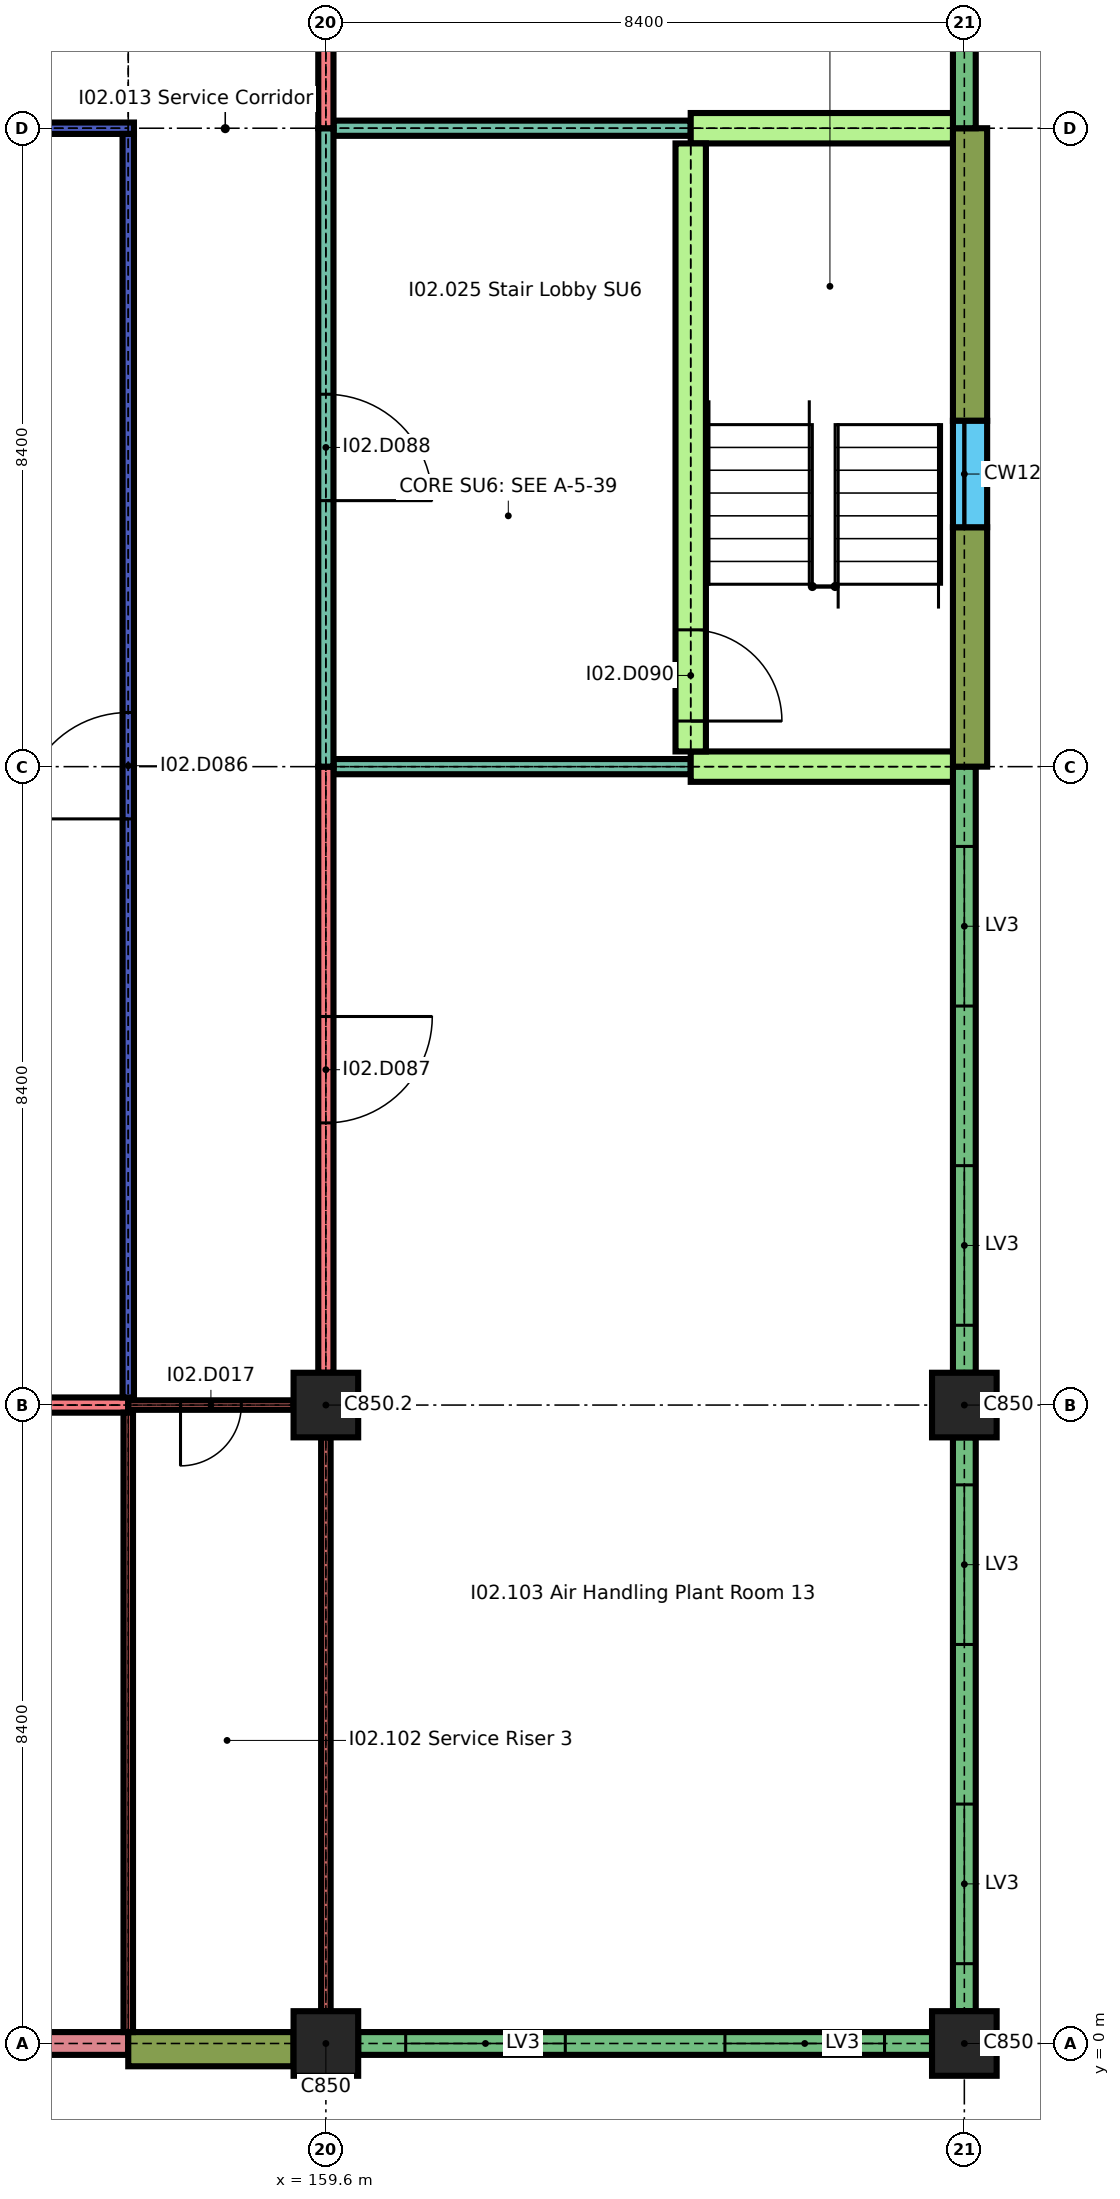
"""IFC4 building model, lengths in metres.
Left out: names, types, materials, properties, quantities, classifications, styles, units other than length and angle.
Written with IfcOpenShell. Run it as: python <this file> out.ifc"""

import sys

from ifc_helpers import new_model, si_unit, direction, frame, frame_2d, origin, origin_2d, place, context, subcontext, project, spatial, rectangle, extrude, element, fill, save


model = new_model("IFC4")
c1 = context("Model", 3, precision=1e-05, world=origin(), true_north=direction((0.0, 1.0)))
c2 = subcontext(c1, "Body", "Model", "MODEL_VIEW")
j1 = project(units=[si_unit("LENGTHUNIT", "METRE"), si_unit("PLANEANGLEUNIT", "RADIAN")], contexts=[c1])
p1 = place(None, origin())
s1 = spatial("IfcSite", under=j1, at=p1, CompositionType="ELEMENT")
p2 = place(p1, origin())
s2 = spatial("IfcBuilding", under=s1, at=p2, CompositionType="ELEMENT")
p3 = place(p2, frame((0.0, 0.0, 12.9)))
s3 = spatial("IfcBuildingStorey", under=s2, at=p3, CompositionType="ELEMENT", Elevation=12.9)
for number, where, z_axis, x_axis in (
    (1, (159.6, 0.0, 0.0), (0.0, 0.0, 1.0), (1.0, 0.0, 0.0)),
    (2, (168.0, 0.0, 0.0), (0.0, 0.0, 1.0), (1.0, 0.0, 0.0)),
    (3, (159.6, 8.4, 0.0), (0.0, 0.0, 1.0), (1.0, 0.0, 0.0)),
    (4, (168.0, 8.4, 0.0), (0.0, 0.0, 1.0), (1.0, 0.0, 0.0)),
):
    element("IfcColumn", number, at=place(p3, frame(where, z_axis=z_axis, x_axis=x_axis)), inside=s3, PredefinedType="COLUMN", context=c2, shape_type="SweptSolid", body=[
        extrude(rectangle(XDim=0.85, YDim=0.85, at=origin_2d()), origin(), (0.0, 0.0, 1.0), 2.04),
    ])
p4 = place(p3, frame((151.625, 0.0, 0.0), z_axis=(0.0, 0.0, 1.0), x_axis=(1.0, 0.0, 0.0)))
e5 = element("IfcWall", 5, at=p4, inside=s3, PredefinedType="SOLIDWALL", context=c2, shape_type="SweptSolid", body=[
    extrude(rectangle(XDim=5.375, YDim=0.3, at=frame_2d((2.688, 0.0))), origin(), (0.0, 0.0, 1.0), 2.04),
])
p5 = place(p4, frame((0.625, 0.0, 0.6)))
e6 = element("IfcOpeningElement", 6, at=p5, cuts=e5, PredefinedType="OPENING", context=c2, shape_type="SweptSolid", body=[
    extrude(rectangle(XDim=2.1, YDim=1.05, at=frame_2d((1.05, 0.525))), frame((0.0, 0.16, 0.0), z_axis=(0.0, -1.0, 0.0), x_axis=(1.0, 0.0, 0.0)), (0.0, 0.0, 1.0), 0.32),
])
p6 = place(p3, frame((157.0, -0.075, 0.0), z_axis=(0.0, 0.0, 1.0), x_axis=(1.0, 0.0, 0.0)))
e7 = element("IfcWall", 7, at=p6, inside=s3, PredefinedType="SOLIDWALL", context=c2, shape_type="SweptSolid", body=[
    extrude(rectangle(XDim=2.175, YDim=0.45, at=frame_2d((1.087, 0.0))), origin(), (0.0, 0.0, 1.0), 2.04),
])
p7 = place(p3, frame((160.025, 0.0, 0.0), z_axis=(0.0, 0.0, 1.0), x_axis=(1.0, 0.0, 0.0)))
e8 = element("IfcWall", 8, at=p7, inside=s3, PredefinedType="SOLIDWALL", context=c2, shape_type="SweptSolid", body=[
    extrude(rectangle(XDim=7.55, YDim=0.3, at=frame_2d((3.775, 0.0))), origin(), (0.0, 0.0, 1.0), 1.74),
])
p8 = place(p7, frame((0.625, 0.0, 0.6)))
e9 = element("IfcOpeningElement", 9, at=p8, cuts=e8, PredefinedType="OPENING", context=c2, shape_type="SweptSolid", body=[
    extrude(rectangle(XDim=2.1, YDim=1.05, at=frame_2d((1.05, 0.525))), frame((0.0, 0.16, 0.0), z_axis=(0.0, -1.0, 0.0), x_axis=(1.0, 0.0, 0.0)), (0.0, 0.0, 1.0), 0.32),
])
p9 = place(p7, frame((4.825, 0.0, 0.6)))
e10 = element("IfcOpeningElement", 10, at=p9, cuts=e8, PredefinedType="OPENING", context=c2, shape_type="SweptSolid", body=[
    extrude(rectangle(XDim=2.1, YDim=1.05, at=frame_2d((1.05, 0.525))), frame((0.0, 0.16, 0.0), z_axis=(0.0, -1.0, 0.0), x_axis=(1.0, 0.0, 0.0)), (0.0, 0.0, 1.0), 0.32),
])
p10 = place(p3, frame((168.0, 0.425, 0.0), z_axis=(0.0, 0.0, 1.0), x_axis=(0.0, 1.0, 0.0)))
e11 = element("IfcWall", 11, at=p10, inside=s3, PredefinedType="SOLIDWALL", context=c2, shape_type="SweptSolid", body=[
    extrude(rectangle(XDim=7.55, YDim=0.3, at=frame_2d((3.775, 0.0))), origin(), (0.0, 0.0, 1.0), 1.74),
])
p11 = place(p10, frame((0.625, 0.0, 0.6)))
e12 = element("IfcOpeningElement", 12, at=p11, cuts=e11, PredefinedType="OPENING", context=c2, shape_type="SweptSolid", body=[
    extrude(rectangle(XDim=2.1, YDim=1.05, at=frame_2d((1.05, 0.525))), frame((0.0, 0.16, 0.0), z_axis=(0.0, -1.0, 0.0), x_axis=(1.0, 0.0, 0.0)), (0.0, 0.0, 1.0), 0.32),
])
p12 = place(p10, frame((4.825, 0.0, 0.6)))
e13 = element("IfcOpeningElement", 13, at=p12, cuts=e11, PredefinedType="OPENING", context=c2, shape_type="SweptSolid", body=[
    extrude(rectangle(XDim=2.1, YDim=1.05, at=frame_2d((1.05, 0.525))), frame((0.0, 0.16, 0.0), z_axis=(0.0, -1.0, 0.0), x_axis=(1.0, 0.0, 0.0)), (0.0, 0.0, 1.0), 0.32),
])
p13 = place(p3, frame((168.0, 8.825, 0.0), z_axis=(0.0, 0.0, 1.0), x_axis=(0.0, 1.0, 0.0)))
e14 = element("IfcWall", 14, at=p13, inside=s3, PredefinedType="SOLIDWALL", context=c2, shape_type="SweptSolid", body=[
    extrude(rectangle(XDim=7.975, YDim=0.3, at=frame_2d((3.988, 0.0))), origin(), (0.0, 0.0, 1.0), 1.74),
])
p14 = place(p13, frame((0.625, 0.0, 0.6)))
e15 = element("IfcOpeningElement", 15, at=p14, cuts=e14, PredefinedType="OPENING", context=c2, shape_type="SweptSolid", body=[
    extrude(rectangle(XDim=2.1, YDim=1.05, at=frame_2d((1.05, 0.525))), frame((0.0, 0.16, 0.0), z_axis=(0.0, -1.0, 0.0), x_axis=(1.0, 0.0, 0.0)), (0.0, 0.0, 1.0), 0.32),
])
p15 = place(p13, frame((4.825, 0.0, 0.6)))
e16 = element("IfcOpeningElement", 16, at=p15, cuts=e14, PredefinedType="OPENING", context=c2, shape_type="SweptSolid", body=[
    extrude(rectangle(XDim=2.1, YDim=1.05, at=frame_2d((1.05, 0.525))), frame((0.0, 0.16, 0.0), z_axis=(0.0, -1.0, 0.0), x_axis=(1.0, 0.0, 0.0)), (0.0, 0.0, 1.0), 0.32),
])
p16 = place(p3, frame((168.075, 16.8, 0.0), z_axis=(0.0, 0.0, 1.0), x_axis=(0.0, 1.0, 0.0)))
e17 = element("IfcWall", 17, at=p16, inside=s3, PredefinedType="SOLIDWALL", context=c2, shape_type="SweptSolid", body=[
    extrude(rectangle(XDim=3.15, YDim=0.45, at=frame_2d((1.575, 0.0))), origin(), (0.0, 0.0, 1.0), 2.04),
])
p17 = place(p3, frame((168.075, 21.35, 0.0), z_axis=(0.0, 0.0, 1.0), x_axis=(0.0, 1.0, 0.0)))
e18 = element("IfcWall", 18, at=p17, inside=s3, PredefinedType="SOLIDWALL", context=c2, shape_type="SweptSolid", body=[
    extrude(rectangle(XDim=3.85, YDim=0.45, at=frame_2d((1.925, 0.0))), origin(), (0.0, 0.0, 1.0), 2.04),
])
p18 = place(p3, frame((168.075, 19.95, 0.0), z_axis=(0.0, 0.0, 1.0), x_axis=(0.0, 1.0, 0.0)))
e19 = element("IfcWall", 19, at=p18, inside=s3, PredefinedType="SOLIDWALL", context=c2, shape_type="SweptSolid", body=[
    extrude(rectangle(XDim=1.4, YDim=0.45, at=frame_2d((0.7, 0.0))), origin(), (0.0, 0.0, 1.0), 0.6),
])
p19 = place(p3, frame((168.0, 25.2, 0.0), z_axis=(0.0, 0.0, 1.0), x_axis=(0.0, 1.0, 0.0)))
e20 = element("IfcWall", 20, at=p19, inside=s3, PredefinedType="SOLIDWALL", context=c2, shape_type="SweptSolid", body=[
    extrude(rectangle(XDim=7.975, YDim=0.3, at=frame_2d((3.988, 0.0))), origin(), (0.0, 0.0, 1.0), 1.74),
])
p20 = place(p19, frame((1.05, 0.0, 0.6)))
e21 = element("IfcOpeningElement", 21, at=p20, cuts=e20, PredefinedType="OPENING", context=c2, shape_type="SweptSolid", body=[
    extrude(rectangle(XDim=2.1, YDim=1.05, at=frame_2d((1.05, 0.525))), frame((0.0, 0.16, 0.0), z_axis=(0.0, -1.0, 0.0), x_axis=(1.0, 0.0, 0.0)), (0.0, 0.0, 1.0), 0.32),
])
p21 = place(p19, frame((5.25, 0.0, 0.6)))
e22 = element("IfcOpeningElement", 22, at=p21, cuts=e20, PredefinedType="OPENING", context=c2, shape_type="SweptSolid", body=[
    extrude(rectangle(XDim=2.1, YDim=1.05, at=frame_2d((1.05, 0.525))), frame((0.0, 0.16, 0.0), z_axis=(0.0, -1.0, 0.0), x_axis=(1.0, 0.0, 0.0)), (0.0, 0.0, 1.0), 0.32),
])
p22 = place(p3, frame((151.625, 8.4, 0.0), z_axis=(0.0, 0.0, 1.0), x_axis=(1.0, 0.0, 0.0)))
e23 = element("IfcWall", 23, at=p22, inside=s3, PredefinedType="SOLIDWALL", context=c2, shape_type="SweptSolid", body=[
    extrude(rectangle(XDim=5.375, YDim=0.2, at=frame_2d((2.688, 0.0))), origin(), (0.0, 0.0, 1.0), 2.04),
])
p23 = place(p3, frame((157.0, 8.4, 0.0), z_axis=(0.0, 0.0, 1.0), x_axis=(1.0, 0.0, 0.0)))
e24 = element("IfcWall", 24, at=p23, inside=s3, PredefinedType="SOLIDWALL", context=c2, shape_type="SweptSolid", body=[
    extrude(rectangle(XDim=2.175, YDim=0.125, at=frame_2d((1.087, 0.0))), origin(), (0.0, 0.0, 1.0), 2.04),
])
p24 = place(p23, frame((0.688, 0.0, 0.0)))
e25 = element("IfcOpeningElement", 25, at=p24, cuts=e24, PredefinedType="OPENING", context=c2, shape_type="SweptSolid", body=[
    extrude(rectangle(XDim=0.8, YDim=2.0, at=frame_2d((0.4, 1.0))), frame((0.0, 0.073, 0.0), z_axis=(0.0, -1.0, 0.0), x_axis=(1.0, 0.0, 0.0)), (0.0, 0.0, 1.0), 0.145),
])
p25 = place(p3, frame((159.7, 16.8, 0.0), z_axis=(0.0, 0.0, 1.0), x_axis=(1.0, 0.0, 0.0)))
e26 = element("IfcWall", 26, at=p25, inside=s3, PredefinedType="PARTITIONING", context=c2, shape_type="SweptSolid", body=[
    extrude(rectangle(XDim=4.7, YDim=0.2, at=frame_2d((2.35, 0.0))), origin(), (0.0, 0.0, 1.0), 2.04),
])
p26 = place(p3, frame((164.4, 16.8, 0.0), z_axis=(0.0, 0.0, 1.0), x_axis=(1.0, 0.0, 0.0)))
e27 = element("IfcWall", 27, at=p26, inside=s3, PredefinedType="SHEAR", context=c2, shape_type="SweptSolid", body=[
    extrude(rectangle(XDim=3.45, YDim=0.4, at=frame_2d((1.725, 0.0))), origin(), (0.0, 0.0, 1.0), 2.04),
])
p27 = place(p3, frame((151.625, 25.2, 0.0), z_axis=(0.0, 0.0, 1.0), x_axis=(1.0, 0.0, 0.0)))
e28 = element("IfcWall", 28, at=p27, inside=s3, PredefinedType="PARTITIONING", context=c2, shape_type="SweptSolid", body=[
    extrude(rectangle(XDim=5.45, YDim=0.15, at=frame_2d((2.725, 0.0))), origin(), (0.0, 0.0, 1.0), 2.04),
])
p28 = place(p3, frame((159.7, 25.2, 0.0), z_axis=(0.0, 0.0, 1.0), x_axis=(1.0, 0.0, 0.0)))
e29 = element("IfcWall", 29, at=p28, inside=s3, PredefinedType="PARTITIONING", context=c2, shape_type="SweptSolid", body=[
    extrude(rectangle(XDim=4.7, YDim=0.2, at=frame_2d((2.35, 0.0))), origin(), (0.0, 0.0, 1.0), 2.04),
])
p29 = place(p3, frame((164.4, 25.2, 0.0), z_axis=(0.0, 0.0, 1.0), x_axis=(1.0, 0.0, 0.0)))
e30 = element("IfcWall", 30, at=p29, inside=s3, PredefinedType="SHEAR", context=c2, shape_type="SweptSolid", body=[
    extrude(rectangle(XDim=3.45, YDim=0.4, at=frame_2d((1.725, 0.0))), origin(), (0.0, 0.0, 1.0), 2.04),
])
p30 = place(p3, frame((157.0, 0.15, 0.0), z_axis=(0.0, 0.0, 1.0), x_axis=(0.0, 1.0, 0.0)))
e31 = element("IfcWall", 31, at=p30, inside=s3, PredefinedType="SOLIDWALL", context=c2, shape_type="SweptSolid", body=[
    extrude(rectangle(XDim=8.15, YDim=0.125, at=frame_2d((4.075, 0.0))), origin(), (0.0, 0.0, 1.0), 2.04),
])
p31 = place(p3, frame((157.0, 8.5, 0.0), z_axis=(0.0, 0.0, 1.0), x_axis=(0.0, 1.0, 0.0)))
e32 = element("IfcWall", 32, at=p31, inside=s3, PredefinedType="PARTITIONING", context=c2, shape_type="SweptSolid", body=[
    extrude(rectangle(XDim=16.625, YDim=0.15, at=frame_2d((8.312, 0.0))), origin(), (0.0, 0.0, 1.0), 2.04),
])
p32 = place(p31, frame((7.613, 0.0, 0.0)))
e33 = element("IfcOpeningElement", 33, at=p32, cuts=e32, PredefinedType="OPENING", context=c2, shape_type="SweptSolid", body=[
    extrude(rectangle(XDim=1.4, YDim=2.0, at=frame_2d((0.7, 1.0))), frame((0.0, 0.085, 0.0), z_axis=(0.0, -1.0, 0.0), x_axis=(1.0, 0.0, 0.0)), (0.0, 0.0, 1.0), 0.17),
])
p33 = place(p3, frame((159.6, 0.425, 0.0), z_axis=(0.0, 0.0, 1.0), x_axis=(0.0, 1.0, 0.0)))
e34 = element("IfcWall", 34, at=p33, inside=s3, PredefinedType="SOLIDWALL", context=c2, shape_type="SweptSolid", body=[
    extrude(rectangle(XDim=7.55, YDim=0.125, at=frame_2d((3.775, 0.0))), origin(), (0.0, 0.0, 1.0), 2.04),
])
p34 = place(p3, frame((159.6, 8.825, 0.0), z_axis=(0.0, 0.0, 1.0), x_axis=(0.0, 1.0, 0.0)))
e35 = element("IfcWall", 35, at=p34, inside=s3, PredefinedType="SOLIDWALL", context=c2, shape_type="SweptSolid", body=[
    extrude(rectangle(XDim=7.975, YDim=0.2, at=frame_2d((3.988, 0.0))), origin(), (0.0, 0.0, 1.0), 2.04),
])
p35 = place(p34, frame((3.288, 0.0, 0.0)))
e36 = element("IfcOpeningElement", 36, at=p35, cuts=e35, PredefinedType="OPENING", context=c2, shape_type="SweptSolid", body=[
    extrude(rectangle(XDim=1.4, YDim=2.0, at=frame_2d((0.7, 1.0))), frame((0.0, 0.11, 0.0), z_axis=(0.0, -1.0, 0.0), x_axis=(1.0, 0.0, 0.0)), (0.0, 0.0, 1.0), 0.22),
])
p36 = place(p3, frame((159.6, 16.8, 0.0), z_axis=(0.0, 0.0, 1.0), x_axis=(0.0, 1.0, 0.0)))
e37 = element("IfcWall", 37, at=p36, inside=s3, PredefinedType="PARTITIONING", context=c2, shape_type="SweptSolid", body=[
    extrude(rectangle(XDim=8.4, YDim=0.2, at=frame_2d((4.2, 0.0))), origin(), (0.0, 0.0, 1.0), 2.04),
])
p37 = place(p36, frame((3.5, 0.0, 0.0)))
e38 = element("IfcOpeningElement", 38, at=p37, cuts=e37, PredefinedType="OPENING", context=c2, shape_type="SweptSolid", body=[
    extrude(rectangle(XDim=1.4, YDim=2.0, at=frame_2d((0.7, 1.0))), frame((0.0, 0.11, 0.0), z_axis=(0.0, -1.0, 0.0), x_axis=(1.0, 0.0, 0.0)), (0.0, 0.0, 1.0), 0.22),
])
p38 = place(p3, frame((159.6, 25.2, 0.0), z_axis=(0.0, 0.0, 1.0), x_axis=(0.0, 1.0, 0.0)))
e39 = element("IfcWall", 39, at=p38, inside=s3, PredefinedType="SOLIDWALL", context=c2, shape_type="SweptSolid", body=[
    extrude(rectangle(XDim=7.975, YDim=0.2, at=frame_2d((3.988, 0.0))), origin(), (0.0, 0.0, 1.0), 2.04),
])
p39 = place(p38, frame((3.488, 0.0, 0.0)))
e40 = element("IfcOpeningElement", 40, at=p39, cuts=e39, PredefinedType="OPENING", context=c2, shape_type="SweptSolid", body=[
    extrude(rectangle(XDim=1.0, YDim=2.0, at=frame_2d((0.5, 1.0))), frame((0.0, 0.11, 0.0), z_axis=(0.0, -1.0, 0.0), x_axis=(1.0, 0.0, 0.0)), (0.0, 0.0, 1.0), 0.22),
])
p40 = place(p3, frame((164.4, 17.0, 0.0), z_axis=(0.0, 0.0, 1.0), x_axis=(0.0, 1.0, 0.0)))
e41 = element("IfcWall", 41, at=p40, inside=s3, PredefinedType="SHEAR", context=c2, shape_type="SweptSolid", body=[
    extrude(rectangle(XDim=8.0, YDim=0.4, at=frame_2d((4.0, 0.0))), origin(), (0.0, 0.0, 1.0), 2.04),
])
p41 = place(p40, frame((0.4, 0.0, 0.0)))
e42 = element("IfcOpeningElement", 42, at=p41, cuts=e41, PredefinedType="OPENING", context=c2, shape_type="SweptSolid", body=[
    extrude(rectangle(XDim=1.2, YDim=2.0, at=frame_2d((0.6, 1.0))), frame((0.0, 0.21, 0.0), z_axis=(0.0, -1.0, 0.0), x_axis=(1.0, 0.0, 0.0)), (0.0, 0.0, 1.0), 0.42),
])
p42 = place(p8, origin())
e43 = element("IfcWindow", 43, at=p42, inside=s3, PartitioningType="SINGLE_PANEL", PredefinedType="WINDOW", context=c2, shape_type="SweptSolid", body=[
    extrude(rectangle(XDim=2.1, YDim=1.05, at=frame_2d((1.05, 0.525))), frame((0.0, 0.075, 0.0), z_axis=(0.0, -1.0, 0.0), x_axis=(1.0, 0.0, 0.0)), (0.0, 0.0, 1.0), 0.15),
])
fill(e9, e43)
p43 = place(p9, origin())
e44 = element("IfcWindow", 44, at=p43, inside=s3, PartitioningType="SINGLE_PANEL", PredefinedType="WINDOW", context=c2, shape_type="SweptSolid", body=[
    extrude(rectangle(XDim=2.1, YDim=1.05, at=frame_2d((1.05, 0.525))), frame((0.0, 0.075, 0.0), z_axis=(0.0, -1.0, 0.0), x_axis=(1.0, 0.0, 0.0)), (0.0, 0.0, 1.0), 0.15),
])
fill(e10, e44)
p44 = place(p11, origin())
e45 = element("IfcWindow", 45, at=p44, inside=s3, PartitioningType="SINGLE_PANEL", PredefinedType="WINDOW", context=c2, shape_type="SweptSolid", body=[
    extrude(rectangle(XDim=2.1, YDim=1.05, at=frame_2d((1.05, 0.525))), frame((0.0, 0.075, 0.0), z_axis=(0.0, -1.0, 0.0), x_axis=(1.0, 0.0, 0.0)), (0.0, 0.0, 1.0), 0.15),
])
fill(e12, e45)
p45 = place(p12, origin())
e46 = element("IfcWindow", 46, at=p45, inside=s3, PartitioningType="SINGLE_PANEL", PredefinedType="WINDOW", context=c2, shape_type="SweptSolid", body=[
    extrude(rectangle(XDim=2.1, YDim=1.05, at=frame_2d((1.05, 0.525))), frame((0.0, 0.075, 0.0), z_axis=(0.0, -1.0, 0.0), x_axis=(1.0, 0.0, 0.0)), (0.0, 0.0, 1.0), 0.15),
])
fill(e13, e46)
p46 = place(p14, origin())
e47 = element("IfcWindow", 47, at=p46, inside=s3, PartitioningType="SINGLE_PANEL", PredefinedType="WINDOW", context=c2, shape_type="SweptSolid", body=[
    extrude(rectangle(XDim=2.1, YDim=1.05, at=frame_2d((1.05, 0.525))), frame((0.0, 0.075, 0.0), z_axis=(0.0, -1.0, 0.0), x_axis=(1.0, 0.0, 0.0)), (0.0, 0.0, 1.0), 0.15),
])
fill(e15, e47)
p47 = place(p15, origin())
e48 = element("IfcWindow", 48, at=p47, inside=s3, PartitioningType="SINGLE_PANEL", PredefinedType="WINDOW", context=c2, shape_type="SweptSolid", body=[
    extrude(rectangle(XDim=2.1, YDim=1.05, at=frame_2d((1.05, 0.525))), frame((0.0, 0.075, 0.0), z_axis=(0.0, -1.0, 0.0), x_axis=(1.0, 0.0, 0.0)), (0.0, 0.0, 1.0), 0.15),
])
fill(e16, e48)
p48 = place(p24, origin())
e49 = element("IfcDoor", 49, at=p48, inside=s3, OperationType="SINGLE_SWING_LEFT", PredefinedType="DOOR", context=c2, shape_type="SweptSolid", body=[
    extrude(rectangle(XDim=0.8, YDim=2.0, at=frame_2d((0.4, 1.0))), frame((0.0, 0.03, 0.0), z_axis=(0.0, -1.0, 0.0), x_axis=(1.0, 0.0, 0.0)), (0.0, 0.0, 1.0), 0.06),
])
fill(e25, e49)
p49 = place(p32, origin())
e50 = element("IfcDoor", 50, at=p49, inside=s3, OperationType="SINGLE_SWING_RIGHT", PredefinedType="DOOR", context=c2, shape_type="SweptSolid", body=[
    extrude(rectangle(XDim=1.4, YDim=2.0, at=frame_2d((0.7, 1.0))), frame((0.0, 0.025, 0.0), z_axis=(0.0, -1.0, 0.0), x_axis=(1.0, 0.0, 0.0)), (0.0, 0.0, 1.0), 0.05),
])
fill(e33, e50)
p50 = place(p35, origin())
e51 = element("IfcDoor", 51, at=p50, inside=s3, OperationType="SINGLE_SWING_RIGHT", PredefinedType="DOOR", context=c2, shape_type="SweptSolid", body=[
    extrude(rectangle(XDim=1.4, YDim=2.0, at=frame_2d((0.7, 1.0))), frame((0.0, 0.025, 0.0), z_axis=(0.0, -1.0, 0.0), x_axis=(1.0, 0.0, 0.0)), (0.0, 0.0, 1.0), 0.05),
])
fill(e36, e51)
p51 = place(p37, origin())
e52 = element("IfcDoor", 52, at=p51, inside=s3, OperationType="SINGLE_SWING_LEFT", PredefinedType="DOOR", context=c2, shape_type="SweptSolid", body=[
    extrude(rectangle(XDim=1.4, YDim=2.0, at=frame_2d((0.7, 1.0))), frame((0.0, 0.03, 0.0), z_axis=(0.0, -1.0, 0.0), x_axis=(1.0, 0.0, 0.0)), (0.0, 0.0, 1.0), 0.06),
])
fill(e38, e52)
p52 = place(p41, origin())
e53 = element("IfcDoor", 53, at=p52, inside=s3, OperationType="SINGLE_SWING_LEFT", PredefinedType="DOOR", context=c2, shape_type="SweptSolid", body=[
    extrude(rectangle(XDim=1.2, YDim=2.0, at=frame_2d((0.6, 1.0))), frame((0.0, 0.025, 0.0), z_axis=(0.0, -1.0, 0.0), x_axis=(1.0, 0.0, 0.0)), (0.0, 0.0, 1.0), 0.05),
])
fill(e42, e53)
save(model, sys.argv[1])
